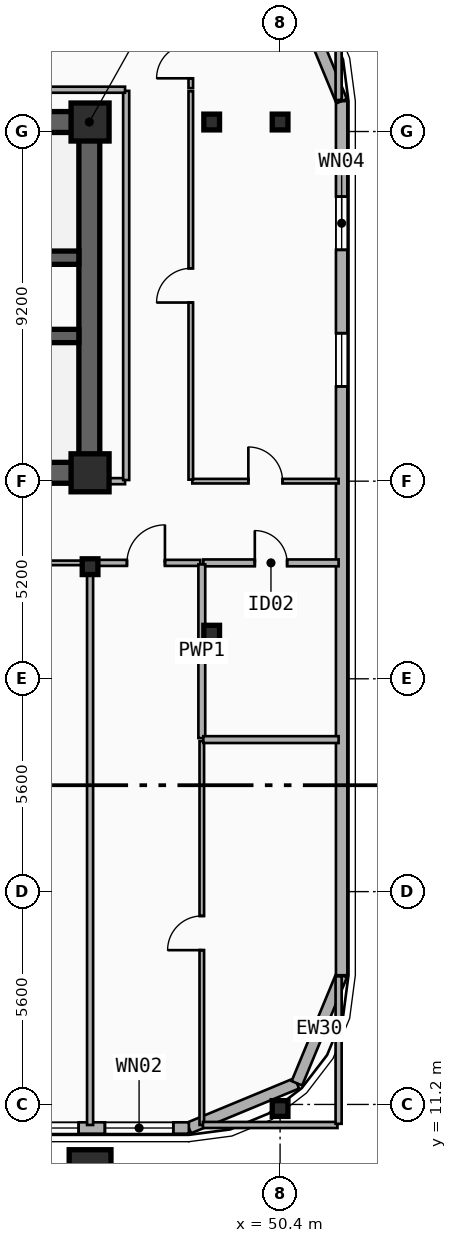
"""IFC4 building model, lengths in metres.
Left out: names, types, materials, properties, quantities, classifications, styles, units other than length and angle.
Written with IfcOpenShell. Run it as: python <this file> out.ifc"""

import sys

from ifc_helpers import new_model, si_unit, direction, frame, frame_2d, origin, origin_2d, place, context, subcontext, project, spatial, rectangle, i_section, extrude, element, fill, save


model = new_model("IFC4")
c1 = context("Model", 3, precision=1e-05, world=origin(), true_north=direction((0.0, 1.0)))
c2 = subcontext(c1, "Body", "Model", "MODEL_VIEW")
j1 = project(units=[si_unit("LENGTHUNIT", "METRE"), si_unit("PLANEANGLEUNIT", "RADIAN")], contexts=[c1])
p1 = place(None, origin())
s1 = spatial("IfcSite", under=j1, at=p1, CompositionType="ELEMENT")
p2 = place(p1, origin())
s2 = spatial("IfcBuilding", under=s1, at=p2, CompositionType="ELEMENT")
p3 = place(p2, frame((0.0, 0.0, 183.85)))
s3 = spatial("IfcBuildingStorey", under=s2, at=p3, CompositionType="ELEMENT", Elevation=183.85)
p4 = place(p3, frame((12.15, 37.05, 0.0), z_axis=(0.0, 0.0, 1.0), x_axis=(1.0, 0.0, 0.0)))
e1 = element("IfcWall", 1, at=p4, inside=s3, PredefinedType="SHEAR", context=c2, shape_type="SweptSolid", body=[
    extrude(rectangle(XDim=33.23, YDim=0.55, at=frame_2d((16.615, 0.0))), origin(), (0.0, 0.0, 1.0), 4.55),
])
p5 = place(p3, frame((45.38, 27.82, 0.0), z_axis=(0.0, 0.0, 1.0), x_axis=(-1.0, 0.0, 0.0)))
e2 = element("IfcWall", 2, at=p5, inside=s3, PredefinedType="SHEAR", context=c2, shape_type="SweptSolid", body=[
    extrude(rectangle(XDim=12.23, YDim=0.55, at=frame_2d((6.115, 0.0))), origin(), (0.0, 0.0, 1.0), 4.55),
])
p6 = place(p5, frame((9.93, 0.0, 0.0)))
e3 = element("IfcOpeningElement", 3, at=p6, cuts=e2, PredefinedType="OPENING", context=c2, shape_type="SweptSolid", body=[
    extrude(rectangle(XDim=1.1, YDim=2.15, at=frame_2d((0.55, 1.075))), frame((0.0, 0.285, 0.0), z_axis=(0.0, -1.0, 0.0), x_axis=(1.0, 0.0, 0.0)), (0.0, 0.0, 1.0), 0.57),
])
p7 = place(p5, frame((6.23, 0.0, 0.0)))
e4 = element("IfcOpeningElement", 4, at=p7, cuts=e2, PredefinedType="OPENING", context=c2, shape_type="SweptSolid", body=[
    extrude(rectangle(XDim=1.1, YDim=2.15, at=frame_2d((0.55, 1.075))), frame((0.0, 0.285, 0.0), z_axis=(0.0, -1.0, 0.0), x_axis=(1.0, 0.0, 0.0)), (0.0, 0.0, 1.0), 0.57),
])
p8 = place(p3, frame((45.38, 28.095, 0.0), z_axis=(0.0, 0.0, 1.0), x_axis=(0.0, 1.0, 0.0)))
e5 = element("IfcWall", 5, at=p8, inside=s3, PredefinedType="SHEAR", context=c2, shape_type="SweptSolid", body=[
    extrude(rectangle(XDim=8.68, YDim=0.55, at=frame_2d((4.34, 0.0))), origin(), (0.0, 0.0, 1.0), 4.55),
])
p9 = place(p3, frame((45.105, 33.48, 0.0), z_axis=(0.0, 0.0, 1.0), x_axis=(-1.0, 0.0, 0.0)))
e6 = element("IfcWall", 6, at=p9, inside=s3, PredefinedType="SHEAR", context=c2, shape_type="SweptSolid", body=[
    extrude(rectangle(XDim=8.55, YDim=0.35, at=frame_2d((4.275, 0.0))), origin(), (0.0, 0.0, 1.0), 4.55),
])
p10 = place(p9, frame((7.205, 0.0, 0.0)))
e7 = element("IfcOpeningElement", 7, at=p10, cuts=e6, PredefinedType="OPENING", context=c2, shape_type="SweptSolid", body=[
    extrude(rectangle(XDim=1.1, YDim=2.15, at=frame_2d((0.55, 1.075))), frame((0.0, 0.185, 0.0), z_axis=(0.0, -1.0, 0.0), x_axis=(1.0, 0.0, 0.0)), (0.0, 0.0, 1.0), 0.37),
])
p11 = place(p3, frame((36.555, 31.42, 0.0), z_axis=(0.0, 0.0, 1.0), x_axis=(1.0, 0.0, 0.0)))
e8 = element("IfcWall", 8, at=p11, inside=s3, PredefinedType="SHEAR", context=c2, shape_type="SweptSolid", body=[
    extrude(rectangle(XDim=8.55, YDim=0.35, at=frame_2d((4.275, 0.0))), origin(), (0.0, 0.0, 1.0), 4.55),
])
for number, where, z_axis, x_axis in (
    (9, (45.4, 27.82, 0.0), (0.0, 0.0, 1.0), (1.0, 0.0, 0.0)),
    (10, (45.4, 37.05, 0.0), (0.0, 0.0, 1.0), (1.0, 0.0, 0.0)),
):
    element("IfcColumn", number, at=place(p3, frame(where, z_axis=z_axis, x_axis=x_axis)), inside=s3, PredefinedType="COLUMN", context=c2, shape_type="SweptSolid", body=[
        extrude(rectangle(XDim=1.0, YDim=1.0, at=origin_2d()), origin(), (0.0, 0.0, 1.0), 4.55),
    ])
p12 = place(p3, frame((45.4, 25.35, 0.0), z_axis=(0.0, 0.0, 1.0), x_axis=(1.0, 0.0, 0.0)))
e11 = element("IfcColumn", 11, at=p12, inside=s3, PredefinedType="COLUMN", context=c2, shape_type="SweptSolid", body=[
    extrude(i_section(OverallWidth=0.413, OverallDepth=0.415, WebThickness=0.03, FlangeThickness=0.047, FilletRadius=0.015, at=origin_2d()), origin(), (0.0, 0.0, 1.0), 4.55),
])
p13 = place(p3, frame((45.4, 9.567, 0.0), z_axis=(0.0, -0.09020808765, 0.995922939249), x_axis=(1.0, 0.0, 0.0)))
e12 = element("IfcColumn", 12, at=p13, inside=s3, PredefinedType="COLUMN", context=c2, shape_type="SweptSolid", body=[
    extrude(rectangle(XDim=1.1, YDim=1.1, at=origin_2d()), origin(), (0.0, 0.0, 1.0), 4.568),
])
for number, where, z_axis, x_axis in (
    (13, (48.6, 23.6, 0.0), (0.0, 0.0, 1.0), (1.0, 0.0, 0.0)),
    (14, (48.6, 37.05, 0.0), (0.0, 0.0, 1.0), (1.0, 0.0, 0.0)),
):
    element("IfcColumn", number, at=place(p3, frame(where, z_axis=z_axis, x_axis=x_axis)), inside=s3, PredefinedType="COLUMN", context=c2, shape_type="SweptSolid", body=[
        extrude(i_section(OverallWidth=0.413, OverallDepth=0.415, WebThickness=0.03, FlangeThickness=0.047, FilletRadius=0.015, at=origin_2d()), origin(), (0.0, 0.0, 1.0), 4.55),
    ])
p14 = place(p3, frame((50.4, 11.189, 0.0), z_axis=(0.0, -0.079911042422, 0.996801999044), x_axis=(1.0, 0.0, 0.0)))
e15 = element("IfcColumn", 15, at=p14, inside=s3, PredefinedType="COLUMN", context=c2, shape_type="SweptSolid", body=[
    extrude(i_section(OverallWidth=0.413, OverallDepth=0.415, WebThickness=0.03, FlangeThickness=0.047, FilletRadius=0.015, at=origin_2d()), origin(), (0.0, 0.0, 1.0), 4.564),
])
p15 = place(p3, frame((50.4, 37.05, 0.0), z_axis=(0.0, 0.0, 1.0), x_axis=(1.0, 0.0, 0.0)))
e16 = element("IfcColumn", 16, at=p15, inside=s3, PredefinedType="COLUMN", context=c2, shape_type="SweptSolid", body=[
    extrude(i_section(OverallWidth=0.413, OverallDepth=0.415, WebThickness=0.03, FlangeThickness=0.047, FilletRadius=0.015, at=origin_2d()), origin(), (0.0, 0.0, 1.0), 4.55),
])
p16 = place(p3, frame((50.843, 11.757, 0.0), z_axis=(0.0, 0.0, 1.0), x_axis=(-0.92389884758, -0.382636798336, 0.0)))
e17 = element("IfcWall", 17, at=p16, inside=s3, PredefinedType="SOLIDWALL", context=c2, shape_type="SweptSolid", body=[
    extrude(rectangle(XDim=3.077, YDim=0.3, at=frame_2d((1.538, 0.0))), origin(), (0.0, 0.0, 1.0), 4.23),
])
p17 = place(p3, frame((52.02, 14.6, 0.0), z_axis=(0.0, 0.0, 1.0), x_axis=(-0.382676475685, -0.923882414032, 0.0)))
e18 = element("IfcWall", 18, at=p17, inside=s3, PredefinedType="SOLIDWALL", context=c2, shape_type="SweptSolid", body=[
    extrude(rectangle(XDim=3.077, YDim=0.3, at=frame_2d((1.539, 0.0))), origin(), (0.0, 0.0, 1.0), 4.23),
])
p18 = place(p3, frame((52.02, 37.6, 0.0), z_axis=(0.0, 0.0, 1.0), x_axis=(0.0, -1.0, 0.0)))
e19 = element("IfcWall", 19, at=p18, inside=s3, PredefinedType="SOLIDWALL", context=c2, shape_type="SweptSolid", body=[
    extrude(rectangle(XDim=23.0, YDim=0.3, at=frame_2d((11.5, 0.0))), origin(), (0.0, 0.0, 1.0), 4.23),
])
p19 = place(p18, frame((2.513, 0.0, 0.75)))
e20 = element("IfcOpeningElement", 20, at=p19, cuts=e19, PredefinedType="OPENING", context=c2, shape_type="SweptSolid", body=[
    extrude(rectangle(XDim=1.4, YDim=2.1, at=frame_2d((0.7, 1.05))), frame((0.0, 0.16, 0.0), z_axis=(0.0, -1.0, 0.0), x_axis=(1.0, 0.0, 0.0)), (0.0, 0.0, 1.0), 0.32),
])
p20 = place(p18, frame((6.107, 0.0, 0.75)))
e21 = element("IfcOpeningElement", 21, at=p20, cuts=e19, PredefinedType="OPENING", context=c2, shape_type="SweptSolid", body=[
    extrude(rectangle(XDim=1.4, YDim=2.1, at=frame_2d((0.7, 1.05))), frame((0.0, 0.16, 0.0), z_axis=(0.0, -1.0, 0.0), x_axis=(1.0, 0.0, 0.0)), (0.0, 0.0, 1.0), 0.32),
])
p21 = place(p3, frame((50.843, 40.443, 0.0), z_axis=(0.0, 0.0, 1.0), x_axis=(0.382704529509, -0.923870793506, 0.0)))
e22 = element("IfcWall", 22, at=p21, inside=s3, PredefinedType="SOLIDWALL", context=c2, shape_type="SweptSolid", body=[
    extrude(rectangle(XDim=3.077, YDim=0.3, at=frame_2d((1.538, 0.0))), origin(), (0.0, 0.0, 1.0), 4.23),
])
p22 = place(p3, frame((48.0, 10.58, 0.0), z_axis=(0.0, 0.0, 1.0), x_axis=(-1.0, 0.0, 0.0)))
e23 = element("IfcWall", 23, at=p22, inside=s3, PredefinedType="SOLIDWALL", context=c2, shape_type="SweptSolid", body=[
    extrude(rectangle(XDim=38.4, YDim=0.3, at=frame_2d((19.2, 0.0))), origin(), (0.0, 0.0, 1.0), 4.23),
])
p23 = place(p22, frame((35.98, 0.0, 0.75)))
e24 = element("IfcOpeningElement", 24, at=p23, cuts=e23, PredefinedType="OPENING", context=c2, shape_type="SweptSolid", body=[
    extrude(rectangle(XDim=2.1, YDim=2.1, at=frame_2d((1.05, 1.05))), frame((0.0, 0.16, 0.0), z_axis=(0.0, -1.0, 0.0), x_axis=(1.0, 0.0, 0.0)), (0.0, 0.0, 1.0), 0.32),
])
p24 = place(p22, frame((25.5, 0.0, 0.75)))
e25 = element("IfcOpeningElement", 25, at=p24, cuts=e23, PredefinedType="OPENING", context=c2, shape_type="SweptSolid", body=[
    extrude(rectangle(XDim=2.1, YDim=2.1, at=frame_2d((1.05, 1.05))), frame((0.0, 0.16, 0.0), z_axis=(0.0, -1.0, 0.0), x_axis=(1.0, 0.0, 0.0)), (0.0, 0.0, 1.0), 0.32),
])
p25 = place(p22, frame((18.15, 0.0, 0.75)))
e26 = element("IfcOpeningElement", 26, at=p25, cuts=e23, PredefinedType="OPENING", context=c2, shape_type="SweptSolid", body=[
    extrude(rectangle(XDim=2.1, YDim=2.1, at=frame_2d((1.05, 1.05))), frame((0.0, 0.16, 0.0), z_axis=(0.0, -1.0, 0.0), x_axis=(1.0, 0.0, 0.0)), (0.0, 0.0, 1.0), 0.32),
])
p26 = place(p22, frame((2.9, 0.0, 0.65)))
e27 = element("IfcOpeningElement", 27, at=p26, cuts=e23, PredefinedType="OPENING", context=c2, shape_type="SweptSolid", body=[
    extrude(rectangle(XDim=2.1, YDim=2.1, at=frame_2d((1.05, 1.05))), frame((0.0, 0.16, 0.0), z_axis=(0.0, -1.0, 0.0), x_axis=(1.0, 0.0, 0.0)), (0.0, 0.0, 1.0), 0.32),
])
p27 = place(p22, frame((0.41, 0.0, 0.8)))
e28 = element("IfcOpeningElement", 28, at=p27, cuts=e23, PredefinedType="OPENING", context=c2, shape_type="SweptSolid", body=[
    extrude(rectangle(XDim=1.8, YDim=1.8, at=frame_2d((0.9, 0.9))), frame((0.0, 0.16, 0.0), z_axis=(0.0, -1.0, 0.0), x_axis=(1.0, 0.0, 0.0)), (0.0, 0.0, 1.0), 0.32),
])
p28 = place(p3, frame((34.84, 25.45, 0.0), z_axis=(0.0, 0.0, 1.0), x_axis=(1.0, 0.0, 0.0)))
e29 = element("IfcWall", 29, at=p28, inside=s3, PredefinedType="PARTITIONING", context=c2, shape_type="SweptSolid", body=[
    extrude(rectangle(XDim=10.52, YDim=0.12, at=frame_2d((5.26, 0.0))), origin(), (0.0, 0.0, 1.0), 3.31),
])
p29 = place(p28, frame((4.81, 0.0, 0.0)))
e30 = element("IfcOpeningElement", 30, at=p29, cuts=e29, PredefinedType="OPENING", context=c2, shape_type="SweptSolid", body=[
    extrude(rectangle(XDim=0.9, YDim=2.1, at=frame_2d((0.45, 1.05))), frame((0.0, 0.07, 0.0), z_axis=(0.0, -1.0, 0.0), x_axis=(1.0, 0.0, 0.0)), (0.0, 0.0, 1.0), 0.14),
])
p30 = place(p3, frame((45.44, 25.45, 0.0), z_axis=(0.0, 0.0, 1.0), x_axis=(1.0, 0.0, 0.0)))
e31 = element("IfcWall", 31, at=p30, inside=s3, PredefinedType="PARTITIONING", context=c2, shape_type="SweptSolid", body=[
    extrude(rectangle(XDim=2.86, YDim=0.16, at=frame_2d((1.43, 0.0))), origin(), (0.0, 0.0, 1.0), 3.31),
])
p31 = place(p30, frame((0.93, 0.0, 0.0)))
e32 = element("IfcOpeningElement", 32, at=p31, cuts=e31, PredefinedType="OPENING", context=c2, shape_type="SweptSolid", body=[
    extrude(rectangle(XDim=1.0, YDim=2.15, at=frame_2d((0.5, 1.075))), frame((0.0, 0.09, 0.0), z_axis=(0.0, -1.0, 0.0), x_axis=(1.0, 0.0, 0.0)), (0.0, 0.0, 1.0), 0.18),
])
p32 = place(p3, frame((48.38, 25.45, 0.0), z_axis=(0.0, 0.0, 1.0), x_axis=(1.0, 0.0, 0.0)))
e33 = element("IfcWall", 33, at=p32, inside=s3, PredefinedType="PLUMBINGWALL", context=c2, shape_type="SweptSolid", body=[
    extrude(rectangle(XDim=3.56, YDim=0.18, at=frame_2d((1.78, 0.0))), origin(), (0.0, 0.0, 1.0), 3.56),
])
p33 = place(p32, frame((1.355, 0.0, 0.0)))
e34 = element("IfcOpeningElement", 34, at=p33, cuts=e33, PredefinedType="OPENING", context=c2, shape_type="SweptSolid", body=[
    extrude(rectangle(XDim=0.85, YDim=2.1, at=frame_2d((0.425, 1.05))), frame((0.0, 0.1, 0.0), z_axis=(0.0, -1.0, 0.0), x_axis=(1.0, 0.0, 0.0)), (0.0, 0.0, 1.0), 0.2),
])
p34 = place(p3, frame((48.09, 27.6, 0.0), z_axis=(0.0, 0.0, 1.0), x_axis=(1.0, 0.0, 0.0)))
e35 = element("IfcWall", 35, at=p34, inside=s3, PredefinedType="PARTITIONING", context=c2, shape_type="SweptSolid", body=[
    extrude(rectangle(XDim=3.85, YDim=0.12, at=frame_2d((1.925, 0.0))), origin(), (0.0, 0.0, 1.0), 3.56),
])
p35 = place(p34, frame((1.475, 0.0, 0.0)))
e36 = element("IfcOpeningElement", 36, at=p35, cuts=e35, PredefinedType="OPENING", context=c2, shape_type="SweptSolid", body=[
    extrude(rectangle(XDim=0.9, YDim=2.1, at=frame_2d((0.45, 1.05))), frame((0.0, 0.07, 0.0), z_axis=(0.0, -1.0, 0.0), x_axis=(1.0, 0.0, 0.0)), (0.0, 0.0, 1.0), 0.14),
])
p36 = place(p3, frame((48.05, 27.64, 0.0), z_axis=(0.0, 0.0, 1.0), x_axis=(0.0, 1.0, 0.0)))
e37 = element("IfcWall", 37, at=p36, inside=s3, PredefinedType="PARTITIONING", context=c2, shape_type="SweptSolid", body=[
    extrude(rectangle(XDim=10.22, YDim=0.12, at=frame_2d((5.11, 0.0))), origin(), (0.0, 0.0, 1.0), 3.71),
])
p37 = place(p36, frame((4.66, 0.0, 0.0)))
e38 = element("IfcOpeningElement", 38, at=p37, cuts=e37, PredefinedType="OPENING", context=c2, shape_type="SweptSolid", body=[
    extrude(rectangle(XDim=0.9, YDim=2.1, at=frame_2d((0.45, 1.05))), frame((0.0, 0.07, 0.0), z_axis=(0.0, -1.0, 0.0), x_axis=(1.0, 0.0, 0.0)), (0.0, 0.0, 1.0), 0.14),
])
p38 = place(p3, frame((48.05, 37.94, 0.0), z_axis=(0.0, 0.0, 1.0), x_axis=(0.0, 1.0, 0.0)))
e39 = element("IfcWall", 39, at=p38, inside=s3, PredefinedType="PARTITIONING", context=c2, shape_type="SweptSolid", body=[
    extrude(rectangle(XDim=1.42, YDim=0.12, at=frame_2d((0.71, 0.0))), origin(), (0.0, 0.0, 1.0), 4.23),
])
p39 = place(p38, frame((0.26, 0.0, 0.0)))
e40 = element("IfcOpeningElement", 40, at=p39, cuts=e39, PredefinedType="OPENING", context=c2, shape_type="SweptSolid", body=[
    extrude(rectangle(XDim=0.9, YDim=2.1, at=frame_2d((0.45, 1.05))), frame((0.0, 0.07, 0.0), z_axis=(0.0, -1.0, 0.0), x_axis=(1.0, 0.0, 0.0)), (0.0, 0.0, 1.0), 0.14),
])
p40 = place(p3, frame((45.4, 10.66, 0.0), z_axis=(0.0, 0.0, 1.0), x_axis=(0.0, 1.0, 0.0)))
e41 = element("IfcWall", 41, at=p40, inside=s3, PredefinedType="PARTITIONING", context=c2, shape_type="SweptSolid", body=[
    extrude(rectangle(XDim=14.75, YDim=0.16, at=frame_2d((7.375, 0.0))), origin(), (0.0, 0.0, 1.0), 3.31),
])
p41 = place(p3, frame((48.34, 10.66, 0.0), z_axis=(0.0, 0.0, 1.0), x_axis=(0.0, 1.0, 0.0)))
e42 = element("IfcWall", 42, at=p41, inside=s3, PredefinedType="PARTITIONING", context=c2, shape_type="SweptSolid", body=[
    extrude(rectangle(XDim=10.1, YDim=0.12, at=frame_2d((5.05, 0.0))), origin(), (0.0, 0.0, 1.0), 3.71),
])
p42 = place(p41, frame((4.6, 0.0, 0.0)))
e43 = element("IfcOpeningElement", 43, at=p42, cuts=e42, PredefinedType="OPENING", context=c2, shape_type="SweptSolid", body=[
    extrude(rectangle(XDim=0.9, YDim=2.1, at=frame_2d((0.45, 1.05))), frame((0.0, 0.07, 0.0), z_axis=(0.0, -1.0, 0.0), x_axis=(1.0, 0.0, 0.0)), (0.0, 0.0, 1.0), 0.14),
])
p43 = place(p3, frame((48.34, 20.84, 0.0), z_axis=(0.0, 0.0, 1.0), x_axis=(0.0, 1.0, 0.0)))
e44 = element("IfcWall", 44, at=p43, inside=s3, PredefinedType="PLUMBINGWALL", context=c2, shape_type="SweptSolid", body=[
    extrude(rectangle(XDim=4.57, YDim=0.18, at=frame_2d((2.285, 0.0))), origin(), (0.0, 0.0, 1.0), 3.71),
])
p44 = place(p3, frame((48.38, 20.8, 0.0), z_axis=(0.0, 0.0, 1.0), x_axis=(1.0, 0.0, 0.0)))
e45 = element("IfcWall", 45, at=p44, inside=s3, PredefinedType="PLUMBINGWALL", context=c2, shape_type="SweptSolid", body=[
    extrude(rectangle(XDim=3.56, YDim=0.18, at=frame_2d((1.78, 0.0))), origin(), (0.0, 0.0, 1.0), 3.56),
])
p45 = place(p3, frame((45.41, 27.6, 0.0), z_axis=(0.0, 0.0, 1.0), x_axis=(1.0, 0.0, 0.0)))
e46 = element("IfcWall", 46, at=p45, inside=s3, PredefinedType="PARTITIONING", context=c2, shape_type="SweptSolid", body=[
    extrude(rectangle(XDim=0.91, YDim=0.16, at=frame_2d((0.455, 0.0))), origin(), (0.0, 0.0, 1.0), 3.3),
])
p46 = place(p3, frame((46.35, 27.63, 0.0), z_axis=(0.0, 0.0, 1.0), x_axis=(0.0, 1.0, 0.0)))
e47 = element("IfcWall", 47, at=p46, inside=s3, PredefinedType="PARTITIONING", context=c2, shape_type="SweptSolid", body=[
    extrude(rectangle(XDim=10.24, YDim=0.16, at=frame_2d((5.12, 0.0))), origin(), (0.0, 0.0, 1.0), 3.71),
])
p47 = place(p3, frame((11.28, 37.9, 0.0), z_axis=(0.0, 0.0, 1.0), x_axis=(1.0, 0.0, 0.0)))
e48 = element("IfcWall", 48, at=p47, inside=s3, PredefinedType="PARTITIONING", context=c2, shape_type="SweptSolid", body=[
    extrude(rectangle(XDim=35.04, YDim=0.16, at=frame_2d((17.52, 0.0))), origin(), (0.0, 0.0, 1.0), 4.23),
])
p48 = place(p3, frame((48.37, 10.66, 0.0), z_axis=(0.0, 0.0, 1.0), x_axis=(1.0, 0.0, 0.0)))
e49 = element("IfcWall", 49, at=p48, inside=s3, PredefinedType="PARTITIONING", context=c2, shape_type="SweptSolid", body=[
    extrude(rectangle(XDim=3.54, YDim=0.16, at=frame_2d((1.77, 0.0))), origin(), (0.0, 0.0, 1.0), 3.56),
])
p49 = place(p3, frame((51.94, 10.69, 0.0), z_axis=(0.0, 0.0, 1.0), x_axis=(0.0, 1.0, 0.0)))
e50 = element("IfcWall", 50, at=p49, inside=s3, PredefinedType="PARTITIONING", context=c2, shape_type="SweptSolid", body=[
    extrude(rectangle(XDim=3.88, YDim=0.16, at=frame_2d((1.94, 0.0))), origin(), (0.0, 0.0, 1.0), 4.23),
])
p50 = place(p3, frame((51.94, 37.63, 0.0), z_axis=(0.0, 0.0, 1.0), x_axis=(0.0, 1.0, 0.0)))
e51 = element("IfcWall", 51, at=p50, inside=s3, PredefinedType="PARTITIONING", context=c2, shape_type="SweptSolid", body=[
    extrude(rectangle(XDim=1.74, YDim=0.16, at=frame_2d((0.87, 0.0))), origin(), (0.0, 0.0, 1.0), 4.23),
])
p51 = place(p19, origin())
e52 = element("IfcWindow", 52, at=p51, inside=s3, PartitioningType="SINGLE_PANEL", PredefinedType="WINDOW", context=c2, shape_type="SweptSolid", body=[
    extrude(rectangle(XDim=1.4, YDim=2.1, at=frame_2d((0.7, 1.05))), frame((0.0, 0.03, 0.0), z_axis=(0.0, -1.0, 0.0), x_axis=(1.0, 0.0, 0.0)), (0.0, 0.0, 1.0), 0.06),
])
fill(e20, e52)
p52 = place(p20, origin())
e53 = element("IfcWindow", 53, at=p52, inside=s3, PartitioningType="SINGLE_PANEL", PredefinedType="WINDOW", context=c2, shape_type="SweptSolid", body=[
    extrude(rectangle(XDim=1.4, YDim=2.1, at=frame_2d((0.7, 1.05))), frame((0.0, 0.03, 0.0), z_axis=(0.0, -1.0, 0.0), x_axis=(1.0, 0.0, 0.0)), (0.0, 0.0, 1.0), 0.06),
])
fill(e21, e53)
p53 = place(p26, origin())
e54 = element("IfcWindow", 54, at=p53, inside=s3, PartitioningType="SINGLE_PANEL", PredefinedType="WINDOW", context=c2, shape_type="SweptSolid", body=[
    extrude(rectangle(XDim=2.1, YDim=2.1, at=frame_2d((1.05, 1.05))), frame((0.0, 0.03, 0.0), z_axis=(0.0, -1.0, 0.0), x_axis=(1.0, 0.0, 0.0)), (0.0, 0.0, 1.0), 0.06),
])
fill(e27, e54)
p54 = place(p27, origin())
e55 = element("IfcWindow", 55, at=p54, inside=s3, PartitioningType="SINGLE_PANEL", PredefinedType="WINDOW", context=c2, shape_type="SweptSolid", body=[
    extrude(rectangle(XDim=1.8, YDim=1.8, at=frame_2d((0.9, 0.9))), frame((0.0, 0.03, 0.0), z_axis=(0.0, -1.0, 0.0), x_axis=(1.0, 0.0, 0.0)), (0.0, 0.0, 1.0), 0.06),
])
fill(e28, e55)
p55 = place(p31, origin())
e56 = element("IfcDoor", 56, at=p55, inside=s3, OperationType="SINGLE_SWING_RIGHT", PredefinedType="DOOR", context=c2, shape_type="SweptSolid", body=[
    extrude(rectangle(XDim=1.0, YDim=2.15, at=frame_2d((0.5, 1.075))), frame((0.0, 0.025, 0.0), z_axis=(0.0, -1.0, 0.0), x_axis=(1.0, 0.0, 0.0)), (0.0, 0.0, 1.0), 0.05),
])
fill(e32, e56)
p56 = place(p33, origin())
e57 = element("IfcDoor", 57, at=p56, inside=s3, OperationType="SINGLE_SWING_LEFT", PredefinedType="DOOR", context=c2, shape_type="SweptSolid", body=[
    extrude(rectangle(XDim=0.85, YDim=2.1, at=frame_2d((0.425, 1.05))), frame((0.0, 0.025, 0.0), z_axis=(0.0, -1.0, 0.0), x_axis=(1.0, 0.0, 0.0)), (0.0, 0.0, 1.0), 0.05),
])
fill(e34, e57)
p57 = place(p35, origin())
e58 = element("IfcDoor", 58, at=p57, inside=s3, OperationType="SINGLE_SWING_LEFT", PredefinedType="DOOR", context=c2, shape_type="SweptSolid", body=[
    extrude(rectangle(XDim=0.9, YDim=2.1, at=frame_2d((0.45, 1.05))), frame((0.0, 0.025, 0.0), z_axis=(0.0, -1.0, 0.0), x_axis=(1.0, 0.0, 0.0)), (0.0, 0.0, 1.0), 0.05),
])
fill(e36, e58)
p58 = place(p37, origin())
e59 = element("IfcDoor", 59, at=p58, inside=s3, OperationType="SINGLE_SWING_LEFT", PredefinedType="DOOR", context=c2, shape_type="SweptSolid", body=[
    extrude(rectangle(XDim=0.9, YDim=2.1, at=frame_2d((0.45, 1.05))), frame((0.0, 0.025, 0.0), z_axis=(0.0, -1.0, 0.0), x_axis=(1.0, 0.0, 0.0)), (0.0, 0.0, 1.0), 0.05),
])
fill(e38, e59)
p59 = place(p39, origin())
e60 = element("IfcDoor", 60, at=p59, inside=s3, OperationType="SINGLE_SWING_LEFT", PredefinedType="DOOR", context=c2, shape_type="SweptSolid", body=[
    extrude(rectangle(XDim=0.9, YDim=2.1, at=frame_2d((0.45, 1.05))), frame((0.0, 0.025, 0.0), z_axis=(0.0, -1.0, 0.0), x_axis=(1.0, 0.0, 0.0)), (0.0, 0.0, 1.0), 0.05),
])
fill(e40, e60)
p60 = place(p42, origin())
e61 = element("IfcDoor", 61, at=p60, inside=s3, OperationType="SINGLE_SWING_LEFT", PredefinedType="DOOR", context=c2, shape_type="SweptSolid", body=[
    extrude(rectangle(XDim=0.9, YDim=2.1, at=frame_2d((0.45, 1.05))), frame((0.0, 0.025, 0.0), z_axis=(0.0, -1.0, 0.0), x_axis=(1.0, 0.0, 0.0)), (0.0, 0.0, 1.0), 0.05),
])
fill(e43, e61)
save(model, sys.argv[1])
